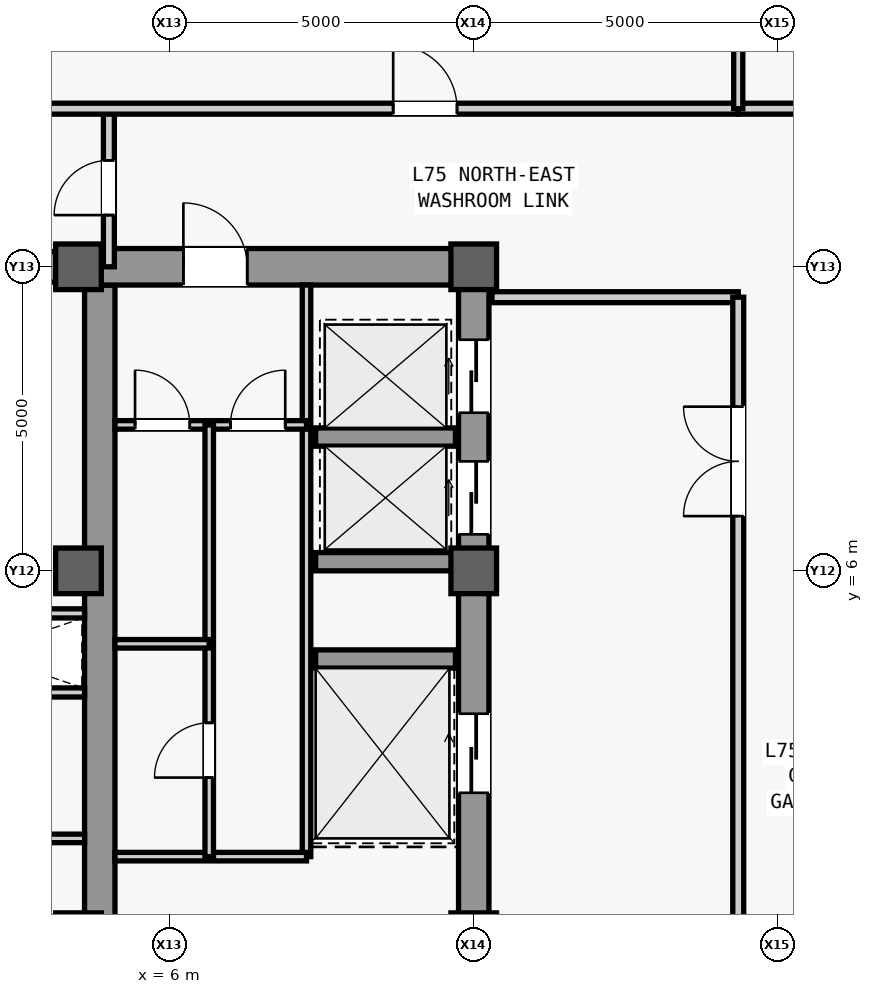
"""IFC4 building model, lengths in metres.
Left out: names, types, materials, properties, quantities, classifications, styles, units other than length and angle.
Written with IfcOpenShell. Run it as: python <this file> out.ifc"""

import sys

from ifc_helpers import new_model, si_unit, direction, frame, frame_2d, origin, origin_2d, place, context, subcontext, project, spatial, rectangle, extrude, source, transform, mapped, element, fill, save


model = new_model("IFC4")
c1 = context("Model", 3, precision=1e-05, world=origin(), true_north=direction((0.0, 1.0)))
c2 = subcontext(c1, "Body", "Model", "MODEL_VIEW")
j1 = project(units=[si_unit("LENGTHUNIT", "METRE"), si_unit("PLANEANGLEUNIT", "RADIAN")], contexts=[c1])
p1 = place(None, origin())
s1 = spatial("IfcSite", under=j1, at=p1, CompositionType="ELEMENT")
p2 = place(p1, origin())
s2 = spatial("IfcBuilding", under=s1, at=p2, CompositionType="ELEMENT")
p3 = place(p2, frame((0.0, 0.0, 317.5)))
s3 = spatial("IfcBuildingStorey", under=s2, at=p3, CompositionType="ELEMENT", Elevation=317.5)
m1 = source(origin(), c2, "Body", "SweptSolid", [
    extrude(rectangle(XDim=22.0, YDim=0.5, at=frame_2d((11.0, 0.0))), origin(), (0.0, 0.0, 1.0), 3.78),
])
p4 = place(p3, frame((11.0, -11.0, 0.0), z_axis=(0.0, 0.0, 1.0), x_axis=(0.0, 1.0, 0.0)))
e1 = element("IfcWall", 1, at=p4, inside=s3, PredefinedType="SHEAR", context=c2, shape_type="MappedRepresentation", body=[
    mapped(m1, transform((0.0, 0.0, 0.0), scale=1.0)),
])
m2 = source(origin(), c2, "Body", "SweptSolid", [
    extrude(rectangle(XDim=1.1, YDim=2.2, at=frame_2d((0.55, 1.1))), frame((0.0, 0.26, 0.0), z_axis=(0.0, -1.0, 0.0), x_axis=(1.0, 0.0, 0.0)), (0.0, 0.0, 1.0), 0.52),
])
p5 = place(p4, frame((0.8, 0.0, 0.0)))
e2 = element("IfcOpeningElement", 2, at=p5, cuts=e1, PredefinedType="OPENING", context=c2, shape_type="MappedRepresentation", body=[
    mapped(m2, transform((0.0, 0.0, 0.0), scale=1.0)),
])
m3 = source(origin(), c2, "Body", "SweptSolid", [
    extrude(rectangle(XDim=0.9, YDim=2.15, at=frame_2d((0.45, 1.075))), frame((0.0, 0.26, 0.0), z_axis=(0.0, -1.0, 0.0), x_axis=(1.0, 0.0, 0.0)), (0.0, 0.0, 1.0), 0.52),
])
p6 = place(p4, frame((6.85, 0.0, 0.0)))
e3 = element("IfcOpeningElement", 3, at=p6, cuts=e1, PredefinedType="OPENING", context=c2, shape_type="MappedRepresentation", body=[
    mapped(m3, transform((0.0, 0.0, 0.0), scale=1.0)),
])
m4 = source(origin(), c2, "Body", "SweptSolid", [
    extrude(rectangle(XDim=1.2, YDim=2.3, at=frame_2d((0.6, 1.15))), frame((0.0, 0.26, 0.0), z_axis=(0.0, -1.0, 0.0), x_axis=(1.0, 0.0, 0.0)), (0.0, 0.0, 1.0), 0.52),
])
p7 = place(p4, frame((17.6, 0.0, 0.0)))
e4 = element("IfcOpeningElement", 4, at=p7, cuts=e1, PredefinedType="OPENING", context=c2, shape_type="MappedRepresentation", body=[
    mapped(m4, transform((0.0, 0.0, 0.0), scale=1.0)),
])
p8 = place(p4, frame((19.6, 0.0, 0.0)))
e5 = element("IfcOpeningElement", 5, at=p8, cuts=e1, PredefinedType="OPENING", context=c2, shape_type="MappedRepresentation", body=[
    mapped(m4, transform((0.0, 0.0, 0.0), scale=1.0)),
])
m5 = source(origin(), c2, "Body", "SweptSolid", [
    extrude(rectangle(XDim=1.3, YDim=2.3, at=frame_2d((0.65, 1.15))), frame((0.0, 0.26, 0.0), z_axis=(0.0, -1.0, 0.0), x_axis=(1.0, 0.0, 0.0)), (0.0, 0.0, 1.0), 0.52),
])
p9 = place(p4, frame((2.7, 0.0, 0.0)))
e6 = element("IfcOpeningElement", 6, at=p9, cuts=e1, PredefinedType="OPENING", context=c2, shape_type="MappedRepresentation", body=[
    mapped(m5, transform((0.0, 0.0, 0.0), scale=1.0)),
])
p10 = place(p4, frame((13.35, 0.0, 0.0)))
e7 = element("IfcOpeningElement", 7, at=p10, cuts=e1, PredefinedType="OPENING", context=c2, shape_type="MappedRepresentation", body=[
    mapped(m5, transform((0.0, 0.0, 0.0), scale=1.0)),
])
m6 = source(origin(), c2, "Body", "SweptSolid", [
    extrude(rectangle(XDim=21.4, YDim=0.5, at=frame_2d((10.7, 0.0))), origin(), (0.0, 0.0, 1.0), 3.78),
])
p11 = place(p3, frame((4.85, -10.7, 0.0), z_axis=(0.0, 0.0, 1.0), x_axis=(0.0, 1.0, 0.0)))
e8 = element("IfcWall", 8, at=p11, inside=s3, PredefinedType="SHEAR", context=c2, shape_type="MappedRepresentation", body=[
    mapped(m6, transform((0.0, 0.0, 0.0), scale=1.0)),
])
m7 = source(origin(), c2, "Body", "SweptSolid", [
    extrude(rectangle(XDim=5.9, YDim=0.6, at=frame_2d((2.95, 0.0))), origin(), (0.0, 0.0, 1.0), 3.78),
])
p12 = place(p3, frame((4.85, 11.0, 0.0), z_axis=(0.0, 0.0, 1.0), x_axis=(1.0, 0.0, 0.0)))
e9 = element("IfcWall", 9, at=p12, inside=s3, PredefinedType="SHEAR", context=c2, shape_type="MappedRepresentation", body=[
    mapped(m7, transform((0.0, 0.0, 0.0), scale=1.0)),
])
m8 = source(origin(), c2, "Body", "SweptSolid", [
    extrude(rectangle(XDim=1.05, YDim=2.2, at=frame_2d((0.525, 1.1))), frame((0.0, 0.31, 0.0), z_axis=(0.0, -1.0, 0.0), x_axis=(1.0, 0.0, 0.0)), (0.0, 0.0, 1.0), 0.62),
])
p13 = place(p12, frame((1.375, 0.0, 0.0)))
e10 = element("IfcOpeningElement", 10, at=p13, cuts=e9, PredefinedType="OPENING", context=c2, shape_type="MappedRepresentation", body=[
    mapped(m8, transform((0.0, 0.0, 0.0), scale=1.0)),
])
m9 = source(origin(), c2, "Body", "SweptSolid", [
    extrude(rectangle(XDim=9.2, YDim=0.5, at=frame_2d((4.6, 0.0))), origin(), (0.0, 0.0, 1.0), 3.78),
])
p14 = place(p3, frame((-4.6, 11.0, 0.0), z_axis=(0.0, 0.0, 1.0), x_axis=(1.0, 0.0, 0.0)))
e11 = element("IfcWall", 11, at=p14, inside=s3, PredefinedType="SHEAR", context=c2, shape_type="MappedRepresentation", body=[
    mapped(m9, transform((0.0, 0.0, 0.0), scale=1.0)),
])
m10 = source(origin(), c2, "Body", "SweptSolid", [
    extrude(rectangle(XDim=0.75, YDim=0.75, at=origin_2d()), origin(), (0.0, 0.0, 1.0), 4.0),
])
for number, where, z_axis, x_axis in (
    (12, (4.5, 0.0, 0.0), (0.0, 0.0, 1.0), (1.0, 0.0, 0.0)),
    (13, (4.5, 6.0, 0.0), (0.0, 0.0, 1.0), (1.0, 0.0, 0.0)),
    (14, (4.5, 11.0, 0.0), (0.0, 0.0, 1.0), (1.0, 0.0, 0.0)),
    (15, (11.0, 0.0, 0.0), (0.0, 0.0, 1.0), (1.0, 0.0, 0.0)),
    (16, (11.0, 6.0, 0.0), (0.0, 0.0, 1.0), (1.0, 0.0, 0.0)),
    (17, (11.0, 11.0, 0.0), (0.0, 0.0, 1.0), (1.0, 0.0, 0.0)),
):
    element("IfcColumn", number, at=place(p3, frame(where, z_axis=z_axis, x_axis=x_axis)), inside=s3, PredefinedType="COLUMN", context=c2, shape_type="MappedRepresentation", body=[
        mapped(m10, transform((0.0, 0.0, 0.0), scale=1.0)),
    ])
m11 = source(origin(), c2, "Body", "SweptSolid", [
    extrude(rectangle(XDim=2.3, YDim=0.3, at=frame_2d((1.15, 0.0))), origin(), (0.0, 0.0, 1.0), 3.78),
])
for number, where, z_axis, x_axis in (
    (18, (8.4, 4.55, 0.0), (0.0, 0.0, 1.0), (1.0, 0.0, 0.0)),
    (19, (8.4, 6.15, 0.0), (0.0, 0.0, 1.0), (1.0, 0.0, 0.0)),
    (20, (8.4, 8.2, 0.0), (0.0, 0.0, 1.0), (1.0, 0.0, 0.0)),
):
    element("IfcWall", number, at=place(p3, frame(where, z_axis=z_axis, x_axis=x_axis)), inside=s3, PredefinedType="SHEAR", context=c2, shape_type="MappedRepresentation", body=[
        mapped(m11, transform((0.0, 0.0, 0.0), scale=1.0)),
    ])
m12 = source(origin(), c2, "Body", "SweptSolid", [
    extrude(rectangle(XDim=9.4, YDim=0.14, at=frame_2d((4.7, 0.0))), origin(), (0.0, 0.0, 1.0), 3.78),
])
p15 = place(p3, frame((8.25, 1.3, 0.0), z_axis=(0.0, 0.0, 1.0), x_axis=(0.0, 1.0, 0.0)))
e21 = element("IfcWall", 21, at=p15, inside=s3, PredefinedType="PARTITIONING", context=c2, shape_type="MappedRepresentation", body=[
    mapped(m12, transform((0.0, 0.0, 0.0), scale=1.0)),
])
m13 = source(origin(), c2, "Body", "SweptSolid", [
    extrude(rectangle(XDim=3.15, YDim=0.14, at=frame_2d((1.575, 0.0))), origin(), (0.0, 0.0, 1.0), 3.78),
])
p16 = place(p3, frame((5.1, 1.3, 0.0), z_axis=(0.0, 0.0, 1.0), x_axis=(1.0, 0.0, 0.0)))
e22 = element("IfcWall", 22, at=p16, inside=s3, PredefinedType="PARTITIONING", context=c2, shape_type="MappedRepresentation", body=[
    mapped(m13, transform((0.0, 0.0, 0.0), scale=1.0)),
])
p17 = place(p3, frame((5.1, 8.4, 0.0), z_axis=(0.0, 0.0, 1.0), x_axis=(1.0, 0.0, 0.0)))
e23 = element("IfcWall", 23, at=p17, inside=s3, PredefinedType="PARTITIONING", context=c2, shape_type="MappedRepresentation", body=[
    mapped(m13, transform((0.0, 0.0, 0.0), scale=1.0)),
])
m14 = source(origin(), c2, "Body", "SweptSolid", [
    extrude(rectangle(XDim=0.9, YDim=2.15, at=frame_2d((0.45, 1.075))), frame((0.0, 0.08, 0.0), z_axis=(0.0, -1.0, 0.0), x_axis=(1.0, 0.0, 0.0)), (0.0, 0.0, 1.0), 0.16),
])
p18 = place(p17, frame((0.33, 0.0, 0.0)))
e24 = element("IfcOpeningElement", 24, at=p18, cuts=e23, PredefinedType="OPENING", context=c2, shape_type="MappedRepresentation", body=[
    mapped(m14, transform((0.0, 0.0, 0.0), scale=1.0)),
])
p19 = place(p17, frame((1.9, 0.0, 0.0)))
e25 = element("IfcOpeningElement", 25, at=p19, cuts=e23, PredefinedType="OPENING", context=c2, shape_type="MappedRepresentation", body=[
    mapped(m14, transform((0.0, 0.0, 0.0), scale=1.0)),
])
m15 = source(origin(), c2, "Body", "SweptSolid", [
    extrude(rectangle(XDim=7.1, YDim=0.14, at=frame_2d((3.55, 0.0))), origin(), (0.0, 0.0, 1.0), 3.78),
])
p20 = place(p3, frame((6.65, 1.3, 0.0), z_axis=(0.0, 0.0, 1.0), x_axis=(0.0, 1.0, 0.0)))
e26 = element("IfcWall", 26, at=p20, inside=s3, PredefinedType="PARTITIONING", context=c2, shape_type="MappedRepresentation", body=[
    mapped(m15, transform((0.0, 0.0, 0.0), scale=1.0)),
])
p21 = place(p20, frame((1.3, 0.0, 0.0)))
e27 = element("IfcOpeningElement", 27, at=p21, cuts=e26, PredefinedType="OPENING", context=c2, shape_type="MappedRepresentation", body=[
    mapped(m14, transform((0.0, 0.0, 0.0), scale=1.0)),
])
m16 = source(origin(), c2, "Body", "SweptSolid", [
    extrude(rectangle(XDim=1.55, YDim=0.14, at=frame_2d((0.775, 0.0))), origin(), (0.0, 0.0, 1.0), 3.78),
])
p22 = place(p3, frame((5.1, 4.8, 0.0), z_axis=(0.0, 0.0, 1.0), x_axis=(1.0, 0.0, 0.0)))
e28 = element("IfcWall", 28, at=p22, inside=s3, PredefinedType="PARTITIONING", context=c2, shape_type="MappedRepresentation", body=[
    mapped(m16, transform((0.0, 0.0, 0.0), scale=1.0)),
])
m17 = source(origin(), c2, "Body", "SweptSolid", [
    extrude(rectangle(XDim=4.05, YDim=0.18, at=frame_2d((2.025, 0.0))), origin(), (0.0, 0.0, 1.0), 3.78),
])
p23 = place(p3, frame((11.3, 10.5, 0.0), z_axis=(0.0, 0.0, 1.0), x_axis=(1.0, 0.0, 0.0)))
e29 = element("IfcWall", 29, at=p23, inside=s3, PredefinedType="PARTITIONING", context=c2, shape_type="MappedRepresentation", body=[
    mapped(m17, transform((0.0, 0.0, 0.0), scale=1.0)),
])
m18 = source(origin(), c2, "Body", "SweptSolid", [
    extrude(rectangle(XDim=16.6, YDim=0.18, at=frame_2d((8.3, 0.0))), origin(), (0.0, 0.0, 1.0), 3.78),
])
p24 = place(p3, frame((15.35, -6.1, 0.0), z_axis=(0.0, 0.0, 1.0), x_axis=(0.0, 1.0, 0.0)))
e30 = element("IfcWall", 30, at=p24, inside=s3, PredefinedType="PARTITIONING", context=c2, shape_type="MappedRepresentation", body=[
    mapped(m18, transform((0.0, 0.0, 0.0), scale=1.0)),
])
m19 = source(origin(), c2, "Body", "SweptSolid", [
    extrude(rectangle(XDim=1.8, YDim=2.25, at=frame_2d((0.9, 1.125))), frame((0.0, 0.1, 0.0), z_axis=(0.0, -1.0, 0.0), x_axis=(1.0, 0.0, 0.0)), (0.0, 0.0, 1.0), 0.2),
])
p25 = place(p24, frame((2.7, 0.0, 0.0)))
e31 = element("IfcOpeningElement", 31, at=p25, cuts=e30, PredefinedType="OPENING", context=c2, shape_type="MappedRepresentation", body=[
    mapped(m19, transform((0.0, 0.0, 0.0), scale=1.0)),
])
p26 = place(p24, frame((13.0, 0.0, 0.0)))
e32 = element("IfcOpeningElement", 32, at=p26, cuts=e30, PredefinedType="OPENING", context=c2, shape_type="MappedRepresentation", body=[
    mapped(m19, transform((0.0, 0.0, 0.0), scale=1.0)),
])
m20 = source(origin(), c2, "Body", "SweptSolid", [
    extrude(rectangle(XDim=3.45, YDim=0.15, at=frame_2d((1.725, 0.0))), origin(), (0.0, 0.0, 1.0), 3.78),
])
for number, where, z_axis, x_axis in (
    (33, (1.15, 4.0, 0.0), (0.0, 0.0, 1.0), (1.0, 0.0, 0.0)),
    (34, (1.15, 5.3, 0.0), (0.0, 0.0, 1.0), (1.0, 0.0, 0.0)),
):
    element("IfcWall", number, at=place(p3, frame(where, z_axis=z_axis, x_axis=x_axis)), inside=s3, PredefinedType="PARTITIONING", context=c2, shape_type="MappedRepresentation", body=[
        mapped(m20, transform((0.0, 0.0, 0.0), scale=1.0)),
    ])
m21 = source(origin(), c2, "Body", "SweptSolid", [
    extrude(rectangle(XDim=3.45, YDim=0.14, at=frame_2d((1.725, 0.0))), origin(), (0.0, 0.0, 1.0), 3.78),
])
p27 = place(p3, frame((1.15, 1.6, 0.0), z_axis=(0.0, 0.0, 1.0), x_axis=(1.0, 0.0, 0.0)))
e35 = element("IfcWall", 35, at=p27, inside=s3, PredefinedType="PARTITIONING", context=c2, shape_type="MappedRepresentation", body=[
    mapped(m21, transform((0.0, 0.0, 0.0), scale=1.0)),
])
m22 = source(origin(), c2, "Body", "SweptSolid", [
    extrude(rectangle(XDim=2.6, YDim=0.18, at=frame_2d((1.3, 0.0))), origin(), (0.0, 0.0, 1.0), 3.78),
])
p28 = place(p3, frame((5.0, 11.0, 0.0), z_axis=(0.0, 0.0, 1.0), x_axis=(0.0, 1.0, 0.0)))
e36 = element("IfcWall", 36, at=p28, inside=s3, PredefinedType="PARTITIONING", context=c2, shape_type="MappedRepresentation", body=[
    mapped(m22, transform((0.0, 0.0, 0.0), scale=1.0)),
])
m23 = source(origin(), c2, "Body", "SweptSolid", [
    extrude(rectangle(XDim=0.9, YDim=2.15, at=frame_2d((0.45, 1.075))), frame((0.0, 0.1, 0.0), z_axis=(0.0, -1.0, 0.0), x_axis=(1.0, 0.0, 0.0)), (0.0, 0.0, 1.0), 0.2),
])
p29 = place(p28, frame((0.85, 0.0, 0.0)))
e37 = element("IfcOpeningElement", 37, at=p29, cuts=e36, PredefinedType="OPENING", context=c2, shape_type="MappedRepresentation", body=[
    mapped(m23, transform((0.0, 0.0, 0.0), scale=1.0)),
])
m24 = source(origin(), c2, "Body", "SweptSolid", [
    extrude(rectangle(XDim=2.4, YDim=0.18, at=frame_2d((1.2, 0.0))), origin(), (0.0, 0.0, 1.0), 3.78),
])
p30 = place(p3, frame((15.35, 13.6, 0.0), z_axis=(0.0, 0.0, 1.0), x_axis=(1.0, 0.0, 0.0)))
e38 = element("IfcWall", 38, at=p30, inside=s3, PredefinedType="PARTITIONING", context=c2, shape_type="MappedRepresentation", body=[
    mapped(m24, transform((0.0, 0.0, 0.0), scale=1.0)),
])
m25 = source(origin(), c2, "Body", "SweptSolid", [
    extrude(rectangle(XDim=32.75, YDim=0.18, at=frame_2d((16.375, 0.0))), origin(), (0.0, 0.0, 1.0), 3.78),
])
p31 = place(p3, frame((-17.4, 13.6, 0.0), z_axis=(0.0, 0.0, 1.0), x_axis=(1.0, 0.0, 0.0)))
e39 = element("IfcWall", 39, at=p31, inside=s3, PredefinedType="PARTITIONING", context=c2, shape_type="MappedRepresentation", body=[
    mapped(m25, transform((0.0, 0.0, 0.0), scale=1.0)),
])
m26 = source(origin(), c2, "Body", "SweptSolid", [
    extrude(rectangle(XDim=1.05, YDim=2.2, at=frame_2d((0.525, 1.1))), frame((0.0, 0.1, 0.0), z_axis=(0.0, -1.0, 0.0), x_axis=(1.0, 0.0, 0.0)), (0.0, 0.0, 1.0), 0.2),
])
p32 = place(p31, frame((27.075, 0.0, 0.0)))
e40 = element("IfcOpeningElement", 40, at=p32, cuts=e39, PredefinedType="OPENING", context=c2, shape_type="MappedRepresentation", body=[
    mapped(m26, transform((0.0, 0.0, 0.0), scale=1.0)),
])
m27 = source(origin(), c2, "Body", "SweptSolid", [
    extrude(rectangle(XDim=14.4, YDim=0.15, at=frame_2d((7.2, 0.0))), origin(), (0.0, 0.0, 1.0), 3.78),
])
p33 = place(p3, frame((15.35, 13.6, 0.0), z_axis=(0.0, 0.0, 1.0), x_axis=(0.0, 1.0, 0.0)))
e41 = element("IfcWall", 41, at=p33, inside=s3, PredefinedType="PARTITIONING", context=c2, shape_type="MappedRepresentation", body=[
    mapped(m27, transform((0.0, 0.0, 0.0), scale=1.0)),
])
m28 = source(origin(), c2, "Body", "SweptSolid", [
    extrude(rectangle(XDim=1.05, YDim=2.2, at=frame_2d((0.525, 1.1))), frame((0.0, 0.025, 0.0), z_axis=(0.0, -1.0, 0.0), x_axis=(1.0, 0.0, 0.0)), (0.0, 0.0, 1.0), 0.05),
])
p34 = place(p13, origin())
e42 = element("IfcDoor", 42, at=p34, inside=s3, OperationType="SINGLE_SWING_LEFT", PredefinedType="DOOR", context=c2, shape_type="MappedRepresentation", body=[
    mapped(m28, transform((0.0, 0.0, 0.0), scale=1.0)),
])
fill(e10, e42)
m29 = source(origin(), c2, "Body", "SweptSolid", [
    extrude(rectangle(XDim=0.9, YDim=2.15, at=frame_2d((0.45, 1.075))), frame((0.0, 0.025, 0.0), z_axis=(0.0, -1.0, 0.0), x_axis=(1.0, 0.0, 0.0)), (0.0, 0.0, 1.0), 0.05),
])
p35 = place(p18, origin())
e43 = element("IfcDoor", 43, at=p35, inside=s3, OperationType="SINGLE_SWING_LEFT", PredefinedType="DOOR", context=c2, shape_type="MappedRepresentation", body=[
    mapped(m29, transform((0.0, 0.0, 0.0), scale=1.0)),
])
fill(e24, e43)
p36 = place(p19, origin())
e44 = element("IfcDoor", 44, at=p36, inside=s3, OperationType="SINGLE_SWING_RIGHT", PredefinedType="DOOR", context=c2, shape_type="MappedRepresentation", body=[
    mapped(m29, transform((0.0, 0.0, 0.0), scale=1.0)),
])
fill(e25, e44)
p37 = place(p21, origin())
e45 = element("IfcDoor", 45, at=p37, inside=s3, OperationType="SINGLE_SWING_LEFT", PredefinedType="DOOR", context=c2, shape_type="MappedRepresentation", body=[
    mapped(m29, transform((0.0, 0.0, 0.0), scale=1.0)),
])
fill(e27, e45)
m30 = source(origin(), c2, "Body", "SweptSolid", [
    extrude(rectangle(XDim=1.8, YDim=2.25, at=frame_2d((0.9, 1.125))), frame((0.0, 0.025, 0.0), z_axis=(0.0, -1.0, 0.0), x_axis=(1.0, 0.0, 0.0)), (0.0, 0.0, 1.0), 0.05),
])
p38 = place(p26, origin())
e46 = element("IfcDoor", 46, at=p38, inside=s3, OperationType="SINGLE_SWING_LEFT", PredefinedType="DOOR", context=c2, shape_type="MappedRepresentation", body=[
    mapped(m30, transform((0.0, 0.0, 0.0), scale=1.0)),
])
fill(e32, e46)
p39 = place(p29, origin())
e47 = element("IfcDoor", 47, at=p39, inside=s3, OperationType="SINGLE_SWING_LEFT", PredefinedType="DOOR", context=c2, shape_type="MappedRepresentation", body=[
    mapped(m29, transform((0.0, 0.0, 0.0), scale=1.0)),
])
fill(e37, e47)
p40 = place(p32, origin())
e48 = element("IfcDoor", 48, at=p40, inside=s3, OperationType="SINGLE_SWING_LEFT", PredefinedType="DOOR", context=c2, shape_type="MappedRepresentation", body=[
    mapped(m28, transform((0.0, 0.0, 0.0), scale=1.0)),
])
fill(e40, e48)
m31 = source(origin(), c2, "Body", "SweptSolid", [
    extrude(rectangle(XDim=1.2, YDim=2.3, at=frame_2d((0.6, 1.15))), frame((0.0, 0.025, 0.0), z_axis=(0.0, -1.0, 0.0), x_axis=(1.0, 0.0, 0.0)), (0.0, 0.0, 1.0), 0.05),
])
p41 = place(p7, origin())
e49 = element("IfcDoor", 49, at=p41, inside=s3, OperationType="SLIDING_TO_LEFT", PredefinedType="DOOR", context=c2, shape_type="MappedRepresentation", body=[
    mapped(m31, transform((0.0, 0.0, 0.0), scale=1.0)),
])
fill(e4, e49)
p42 = place(p8, origin())
e50 = element("IfcDoor", 50, at=p42, inside=s3, OperationType="SLIDING_TO_LEFT", PredefinedType="DOOR", context=c2, shape_type="MappedRepresentation", body=[
    mapped(m31, transform((0.0, 0.0, 0.0), scale=1.0)),
])
fill(e5, e50)
m32 = source(origin(), c2, "Body", "SweptSolid", [
    extrude(rectangle(XDim=1.3, YDim=2.3, at=frame_2d((0.65, 1.15))), frame((0.0, 0.025, 0.0), z_axis=(0.0, -1.0, 0.0), x_axis=(1.0, 0.0, 0.0)), (0.0, 0.0, 1.0), 0.05),
])
p43 = place(p10, origin())
e51 = element("IfcDoor", 51, at=p43, inside=s3, OperationType="SLIDING_TO_LEFT", PredefinedType="DOOR", context=c2, shape_type="MappedRepresentation", body=[
    mapped(m32, transform((0.0, 0.0, 0.0), scale=1.0)),
])
fill(e7, e51)
save(model, sys.argv[1])
